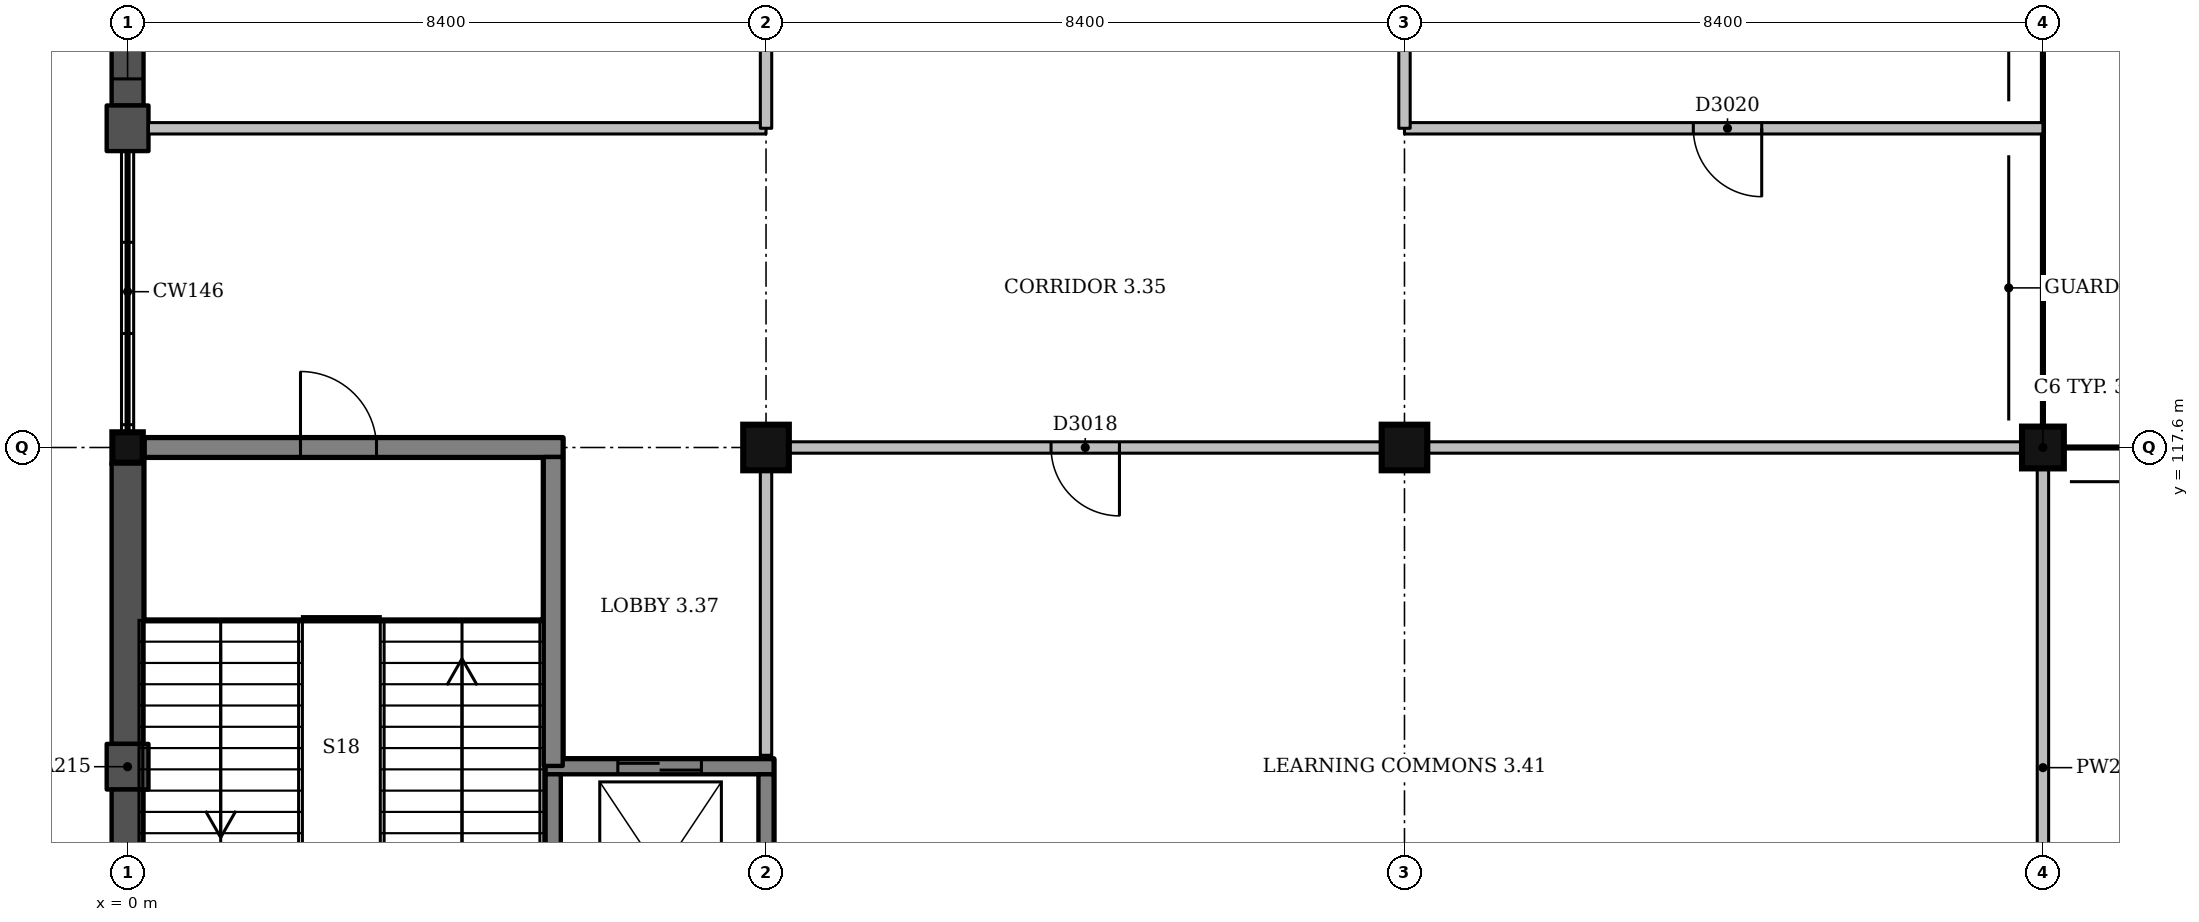
"""IFC4 building model, lengths in metres.
Left out: names, types, materials, properties, quantities, classifications, styles, units other than length and angle.
Written with IfcOpenShell. Run it as: python <this file> out.ifc"""

import sys

from ifc_helpers import new_model, si_unit, direction, frame, frame_2d, origin, origin_2d, place, context, subcontext, project, spatial, rectangle, extrude, element, fill, save


model = new_model("IFC4")
c1 = context("Model", 3, precision=1e-05, world=origin(), true_north=direction((0.0, 1.0)))
c2 = subcontext(c1, "Body", "Model", "MODEL_VIEW")
j1 = project(units=[si_unit("LENGTHUNIT", "METRE"), si_unit("PLANEANGLEUNIT", "RADIAN")], contexts=[c1])
p1 = place(None, origin())
s1 = spatial("IfcSite", under=j1, at=p1, CompositionType="ELEMENT")
p2 = place(p1, origin())
s2 = spatial("IfcBuilding", under=s1, at=p2, CompositionType="ELEMENT")
p3 = place(p2, frame((0.0, 0.0, 13.5)))
s3 = spatial("IfcBuildingStorey", under=s2, at=p3, CompositionType="ELEMENT", Elevation=13.5)
p4 = place(p3, frame((0.0, 117.6, 0.0), z_axis=(0.0, 0.0, 1.0), x_axis=(1.0, 0.0, 0.0)))
e1 = element("IfcColumn", 1, at=p4, inside=s3, PredefinedType="COLUMN", context=c2, shape_type="SweptSolid", body=[
    extrude(rectangle(XDim=0.4, YDim=0.4, at=origin_2d()), origin(), (0.0, 0.0, 1.0), 4.5),
])
for number, where, z_axis, x_axis in (
    (2, (8.4, 117.6, 0.0), (0.0, 0.0, 1.0), (1.0, 0.0, 0.0)),
    (3, (16.8, 117.6, 0.0), (0.0, 0.0, 1.0), (1.0, 0.0, 0.0)),
):
    element("IfcColumn", number, at=place(p3, frame(where, z_axis=z_axis, x_axis=x_axis)), inside=s3, PredefinedType="COLUMN", context=c2, shape_type="SweptSolid", body=[
        extrude(rectangle(XDim=0.6, YDim=0.6, at=origin_2d()), origin(), (0.0, 0.0, 1.0), 4.5),
    ])
p5 = place(p3, frame((25.2, 117.6, 0.0), z_axis=(0.0, 0.0, 1.0), x_axis=(1.0, 0.0, 0.0)))
e4 = element("IfcColumn", 4, at=p5, inside=s3, PredefinedType="COLUMN", context=c2, shape_type="SweptSolid", body=[
    extrude(rectangle(XDim=0.55, YDim=0.55, at=origin_2d()), origin(), (0.0, 0.0, 1.0), 4.5),
])
p6 = place(p3, frame((5.5, 113.4, 0.0), z_axis=(0.0, 0.0, 1.0), x_axis=(1.0, 0.0, 0.0)))
e5 = element("IfcWall", 5, at=p6, inside=s3, PredefinedType="SHEAR", context=c2, shape_type="SweptSolid", body=[
    extrude(rectangle(XDim=3.0, YDim=0.2, at=frame_2d((1.5, 0.0))), origin(), (0.0, 0.0, 1.0), 4.5),
])
p7 = place(p6, frame((0.95, 0.0, 0.0)))
e6 = element("IfcOpeningElement", 6, at=p7, cuts=e5, PredefinedType="OPENING", context=c2, shape_type="SweptSolid", body=[
    extrude(rectangle(XDim=1.1, YDim=2.1, at=frame_2d((0.55, 1.05))), frame((0.0, 0.11, 0.0), z_axis=(0.0, -1.0, 0.0), x_axis=(1.0, 0.0, 0.0)), (0.0, 0.0, 1.0), 0.22),
])
p8 = place(p3, frame((5.6, 109.3, 0.0), z_axis=(0.0, 0.0, 1.0), x_axis=(0.0, 1.0, 0.0)))
e7 = element("IfcWall", 7, at=p8, inside=s3, PredefinedType="SHEAR", context=c2, shape_type="SweptSolid", body=[
    extrude(rectangle(XDim=4.0, YDim=0.2, at=frame_2d((2.0, 0.0))), origin(), (0.0, 0.0, 1.0), 4.5),
])
p9 = place(p3, frame((8.4, 109.525, 0.0), z_axis=(0.0, 0.0, 1.0), x_axis=(0.0, 1.0, 0.0)))
e8 = element("IfcWall", 8, at=p9, inside=s3, PredefinedType="SHEAR", context=c2, shape_type="SweptSolid", body=[
    extrude(rectangle(XDim=3.775, YDim=0.2, at=frame_2d((1.888, 0.0))), origin(), (0.0, 0.0, 1.0), 4.5),
])
p10 = place(p3, frame((0.225, 117.6, 0.0), z_axis=(0.0, 0.0, 1.0), x_axis=(1.0, 0.0, 0.0)))
e9 = element("IfcWall", 9, at=p10, inside=s3, PredefinedType="SHEAR", context=c2, shape_type="SweptSolid", body=[
    extrude(rectangle(XDim=5.5, YDim=0.25, at=frame_2d((2.75, 0.0))), origin(), (0.0, 0.0, 1.0), 4.5),
])
p11 = place(p10, frame((2.05, 0.0, 0.0)))
e10 = element("IfcOpeningElement", 10, at=p11, cuts=e9, PredefinedType="OPENING", context=c2, shape_type="SweptSolid", body=[
    extrude(rectangle(XDim=1.0, YDim=2.1, at=frame_2d((0.5, 1.05))), frame((0.0, 0.135, 0.0), z_axis=(0.0, -1.0, 0.0), x_axis=(1.0, 0.0, 0.0)), (0.0, 0.0, 1.0), 0.27),
])
p12 = place(p3, frame((5.6, 113.41, 0.0), z_axis=(0.0, 0.0, 1.0), x_axis=(0.0, 1.0, 0.0)))
e11 = element("IfcWall", 11, at=p12, inside=s3, PredefinedType="SHEAR", context=c2, shape_type="SweptSolid", body=[
    extrude(rectangle(XDim=4.065, YDim=0.25, at=frame_2d((2.033, 0.0))), origin(), (0.0, 0.0, 1.0), 4.5),
])
p13 = place(p3, frame((0.0, 125.8, 0.0), z_axis=(0.0, 0.0, 1.0), x_axis=(0.0, -1.0, 0.0)))
e12 = element("IfcWall", 12, at=p13, inside=s3, PredefinedType="SOLIDWALL", context=c2, shape_type="SweptSolid", body=[
    extrude(rectangle(XDim=3.7, YDim=0.42, at=frame_2d((1.85, 0.0))), origin(), (0.0, 0.0, 1.0), 3.35),
])
p14 = place(p13, frame((0.35, 0.0, 1.0)))
e13 = element("IfcOpeningElement", 13, at=p14, cuts=e12, PredefinedType="OPENING", context=c2, shape_type="SweptSolid", body=[
    extrude(rectangle(XDim=0.6, YDim=1.8, at=frame_2d((0.3, 0.9))), frame((0.0, 0.22, 0.0), z_axis=(0.0, -1.0, 0.0), x_axis=(1.0, 0.0, 0.0)), (0.0, 0.0, 1.0), 0.44),
])
p15 = place(p13, frame((1.55, 0.0, 1.0)))
e14 = element("IfcOpeningElement", 14, at=p15, cuts=e12, PredefinedType="OPENING", context=c2, shape_type="SweptSolid", body=[
    extrude(rectangle(XDim=0.6, YDim=1.8, at=frame_2d((0.3, 0.9))), frame((0.0, 0.22, 0.0), z_axis=(0.0, -1.0, 0.0), x_axis=(1.0, 0.0, 0.0)), (0.0, 0.0, 1.0), 0.44),
])
p16 = place(p13, frame((2.75, 0.0, 1.0)))
e15 = element("IfcOpeningElement", 15, at=p16, cuts=e12, PredefinedType="OPENING", context=c2, shape_type="SweptSolid", body=[
    extrude(rectangle(XDim=0.6, YDim=1.8, at=frame_2d((0.3, 0.9))), frame((0.0, 0.22, 0.0), z_axis=(0.0, -1.0, 0.0), x_axis=(1.0, 0.0, 0.0)), (0.0, 0.0, 1.0), 0.44),
])
p17 = place(p3, frame((0.0, 122.1, 0.0), z_axis=(0.0, 0.0, 1.0), x_axis=(0.0, -1.0, 0.0)))
e16 = element("IfcWall", 16, at=p17, inside=s3, PredefinedType="SOLIDWALL", context=c2, shape_type="SweptSolid", body=[
    extrude(rectangle(XDim=0.6, YDim=0.55, at=frame_2d((0.3, 0.0))), origin(), (0.0, 0.0, 1.0), 3.35),
])
p18 = place(p3, frame((0.0, 117.4, 0.0), z_axis=(0.0, 0.0, 1.0), x_axis=(0.0, -1.0, 0.0)))
e17 = element("IfcWall", 17, at=p18, inside=s3, PredefinedType="SOLIDWALL", context=c2, shape_type="SweptSolid", body=[
    extrude(rectangle(XDim=3.7, YDim=0.42, at=frame_2d((1.85, 0.0))), origin(), (0.0, 0.0, 1.0), 4.5),
])
p19 = place(p3, frame((0.0, 113.7, 0.0), z_axis=(0.0, 0.0, 1.0), x_axis=(0.0, -1.0, 0.0)))
e18 = element("IfcWall", 18, at=p19, inside=s3, PredefinedType="SOLIDWALL", context=c2, shape_type="SweptSolid", body=[
    extrude(rectangle(XDim=0.6, YDim=0.55, at=frame_2d((0.3, 0.0))), origin(), (0.0, 0.0, 1.0), 4.5),
])
p20 = place(p3, frame((0.0, 113.1, 0.0), z_axis=(0.0, 0.0, 1.0), x_axis=(0.0, -1.0, 0.0)))
e19 = element("IfcWall", 19, at=p20, inside=s3, PredefinedType="SOLIDWALL", context=c2, shape_type="SweptSolid", body=[
    extrude(rectangle(XDim=3.7, YDim=0.42, at=frame_2d((1.85, 0.0))), origin(), (0.0, 0.0, 1.0), 4.5),
])
p21 = place(p3, frame((8.7, 117.6, 0.0), z_axis=(0.0, 0.0, 1.0), x_axis=(1.0, 0.0, 0.0)))
e20 = element("IfcWall", 20, at=p21, inside=s3, PredefinedType="PARTITIONING", context=c2, shape_type="SweptSolid", body=[
    extrude(rectangle(XDim=7.8, YDim=0.15, at=frame_2d((3.9, 0.0))), origin(), (0.0, 0.0, 1.0), 3.4),
])
p22 = place(p21, frame((3.45, 0.0, 0.0)))
e21 = element("IfcOpeningElement", 21, at=p22, cuts=e20, PredefinedType="OPENING", context=c2, shape_type="SweptSolid", body=[
    extrude(rectangle(XDim=0.9, YDim=2.1, at=frame_2d((0.45, 1.05))), frame((0.0, 0.085, 0.0), z_axis=(0.0, -1.0, 0.0), x_axis=(1.0, 0.0, 0.0)), (0.0, 0.0, 1.0), 0.17),
])
p23 = place(p3, frame((17.1, 117.6, 0.0), z_axis=(0.0, 0.0, 1.0), x_axis=(1.0, 0.0, 0.0)))
e22 = element("IfcWall", 22, at=p23, inside=s3, PredefinedType="PARTITIONING", context=c2, shape_type="SweptSolid", body=[
    extrude(rectangle(XDim=7.825, YDim=0.15, at=frame_2d((3.913, 0.0))), origin(), (0.0, 0.0, 1.0), 3.4),
])
p24 = place(p3, frame((0.275, 121.8, 0.0), z_axis=(0.0, 0.0, 1.0), x_axis=(1.0, 0.0, 0.0)))
e23 = element("IfcWall", 23, at=p24, inside=s3, PredefinedType="PARTITIONING", context=c2, shape_type="SweptSolid", body=[
    extrude(rectangle(XDim=8.125, YDim=0.15, at=frame_2d((4.062, 0.0))), origin(), (0.0, 0.0, 1.0), 3.4),
])
p25 = place(p3, frame((16.8, 121.8, 0.0), z_axis=(0.0, 0.0, 1.0), x_axis=(1.0, 0.0, 0.0)))
e24 = element("IfcWall", 24, at=p25, inside=s3, PredefinedType="PARTITIONING", context=c2, shape_type="SweptSolid", body=[
    extrude(rectangle(XDim=8.4, YDim=0.15, at=frame_2d((4.2, 0.0))), origin(), (0.0, 0.0, 1.0), 3.4),
])
p26 = place(p25, frame((3.8, 0.0, 0.0)))
e25 = element("IfcOpeningElement", 25, at=p26, cuts=e24, PredefinedType="OPENING", context=c2, shape_type="SweptSolid", body=[
    extrude(rectangle(XDim=0.9, YDim=2.1, at=frame_2d((0.45, 1.05))), frame((0.0, 0.085, 0.0), z_axis=(0.0, -1.0, 0.0), x_axis=(1.0, 0.0, 0.0)), (0.0, 0.0, 1.0), 0.17),
])
p27 = place(p3, frame((8.4, 113.55, 0.0), z_axis=(0.0, 0.0, 1.0), x_axis=(0.0, 1.0, 0.0)))
e26 = element("IfcWall", 26, at=p27, inside=s3, PredefinedType="PARTITIONING", context=c2, shape_type="SweptSolid", body=[
    extrude(rectangle(XDim=3.75, YDim=0.15, at=frame_2d((1.875, 0.0))), origin(), (0.0, 0.0, 1.0), 3.4),
])
p28 = place(p3, frame((8.4, 121.8, 0.0), z_axis=(0.0, 0.0, 1.0), x_axis=(0.0, 1.0, 0.0)))
e27 = element("IfcWall", 27, at=p28, inside=s3, PredefinedType="PARTITIONING", context=c2, shape_type="SweptSolid", body=[
    extrude(rectangle(XDim=3.9, YDim=0.15, at=frame_2d((1.95, 0.0))), origin(), (0.0, 0.0, 1.0), 3.4),
])
p29 = place(p28, frame((1.35, 0.0, 0.0)))
e28 = element("IfcOpeningElement", 28, at=p29, cuts=e27, PredefinedType="OPENING", context=c2, shape_type="SweptSolid", body=[
    extrude(rectangle(XDim=1.0, YDim=2.1, at=frame_2d((0.5, 1.05))), frame((0.0, 0.085, 0.0), z_axis=(0.0, -1.0, 0.0), x_axis=(1.0, 0.0, 0.0)), (0.0, 0.0, 1.0), 0.17),
])
p30 = place(p3, frame((16.8, 121.8, 0.0), z_axis=(0.0, 0.0, 1.0), x_axis=(0.0, 1.0, 0.0)))
e29 = element("IfcWall", 29, at=p30, inside=s3, PredefinedType="PARTITIONING", context=c2, shape_type="SweptSolid", body=[
    extrude(rectangle(XDim=3.9, YDim=0.15, at=frame_2d((1.95, 0.0))), origin(), (0.0, 0.0, 1.0), 3.4),
])
p31 = place(p3, frame((25.2, 109.45, 0.0), z_axis=(0.0, 0.0, 1.0), x_axis=(0.0, 1.0, 0.0)))
e30 = element("IfcWall", 30, at=p31, inside=s3, PredefinedType="PARTITIONING", context=c2, shape_type="SweptSolid", body=[
    extrude(rectangle(XDim=7.875, YDim=0.15, at=frame_2d((3.938, 0.0))), origin(), (0.0, 0.0, 1.0), 4.15),
])
p32 = place(p16, origin())
e31 = element("IfcWindow", 31, at=p32, inside=s3, PartitioningType="SINGLE_PANEL", PredefinedType="WINDOW", context=c2, shape_type="SweptSolid", body=[
    extrude(rectangle(XDim=0.6, YDim=1.8, at=frame_2d((0.3, 0.9))), frame((0.0, 0.15, 0.0), z_axis=(0.0, -1.0, 0.0), x_axis=(1.0, 0.0, 0.0)), (0.0, 0.0, 1.0), 0.06),
])
fill(e15, e31)
p33 = place(p22, origin())
e32 = element("IfcDoor", 32, at=p33, inside=s3, OperationType="SINGLE_SWING_RIGHT", PredefinedType="DOOR", context=c2, shape_type="SweptSolid", body=[
    extrude(rectangle(XDim=0.9, YDim=2.1, at=frame_2d((0.45, 1.05))), frame((0.0, 0.025, 0.0), z_axis=(0.0, -1.0, 0.0), x_axis=(1.0, 0.0, 0.0)), (0.0, 0.0, 1.0), 0.05),
])
fill(e21, e32)
p34 = place(p26, origin())
e33 = element("IfcDoor", 33, at=p34, inside=s3, OperationType="SINGLE_SWING_RIGHT", PredefinedType="DOOR", context=c2, shape_type="SweptSolid", body=[
    extrude(rectangle(XDim=0.9, YDim=2.1, at=frame_2d((0.45, 1.05))), frame((0.0, 0.025, 0.0), z_axis=(0.0, -1.0, 0.0), x_axis=(1.0, 0.0, 0.0)), (0.0, 0.0, 1.0), 0.05),
])
fill(e25, e33)
p35 = place(p11, origin())
e34 = element("IfcDoor", 34, at=p35, inside=s3, OperationType="SINGLE_SWING_LEFT", PredefinedType="DOOR", context=c2, shape_type="SweptSolid", body=[
    extrude(rectangle(XDim=1.0, YDim=2.1, at=frame_2d((0.5, 1.05))), frame((0.0, 0.025, 0.0), z_axis=(0.0, -1.0, 0.0), x_axis=(1.0, 0.0, 0.0)), (0.0, 0.0, 1.0), 0.05),
])
fill(e10, e34)
p36 = place(p7, origin())
e35 = element("IfcDoor", 35, at=p36, inside=s3, OperationType="SLIDING_TO_RIGHT", PredefinedType="DOOR", context=c2, shape_type="SweptSolid", body=[
    extrude(rectangle(XDim=1.1, YDim=2.1, at=frame_2d((0.55, 1.05))), frame((0.0, 0.025, 0.0), z_axis=(0.0, -1.0, 0.0), x_axis=(1.0, 0.0, 0.0)), (0.0, 0.0, 1.0), 0.05),
])
fill(e6, e35)
save(model, sys.argv[1])
